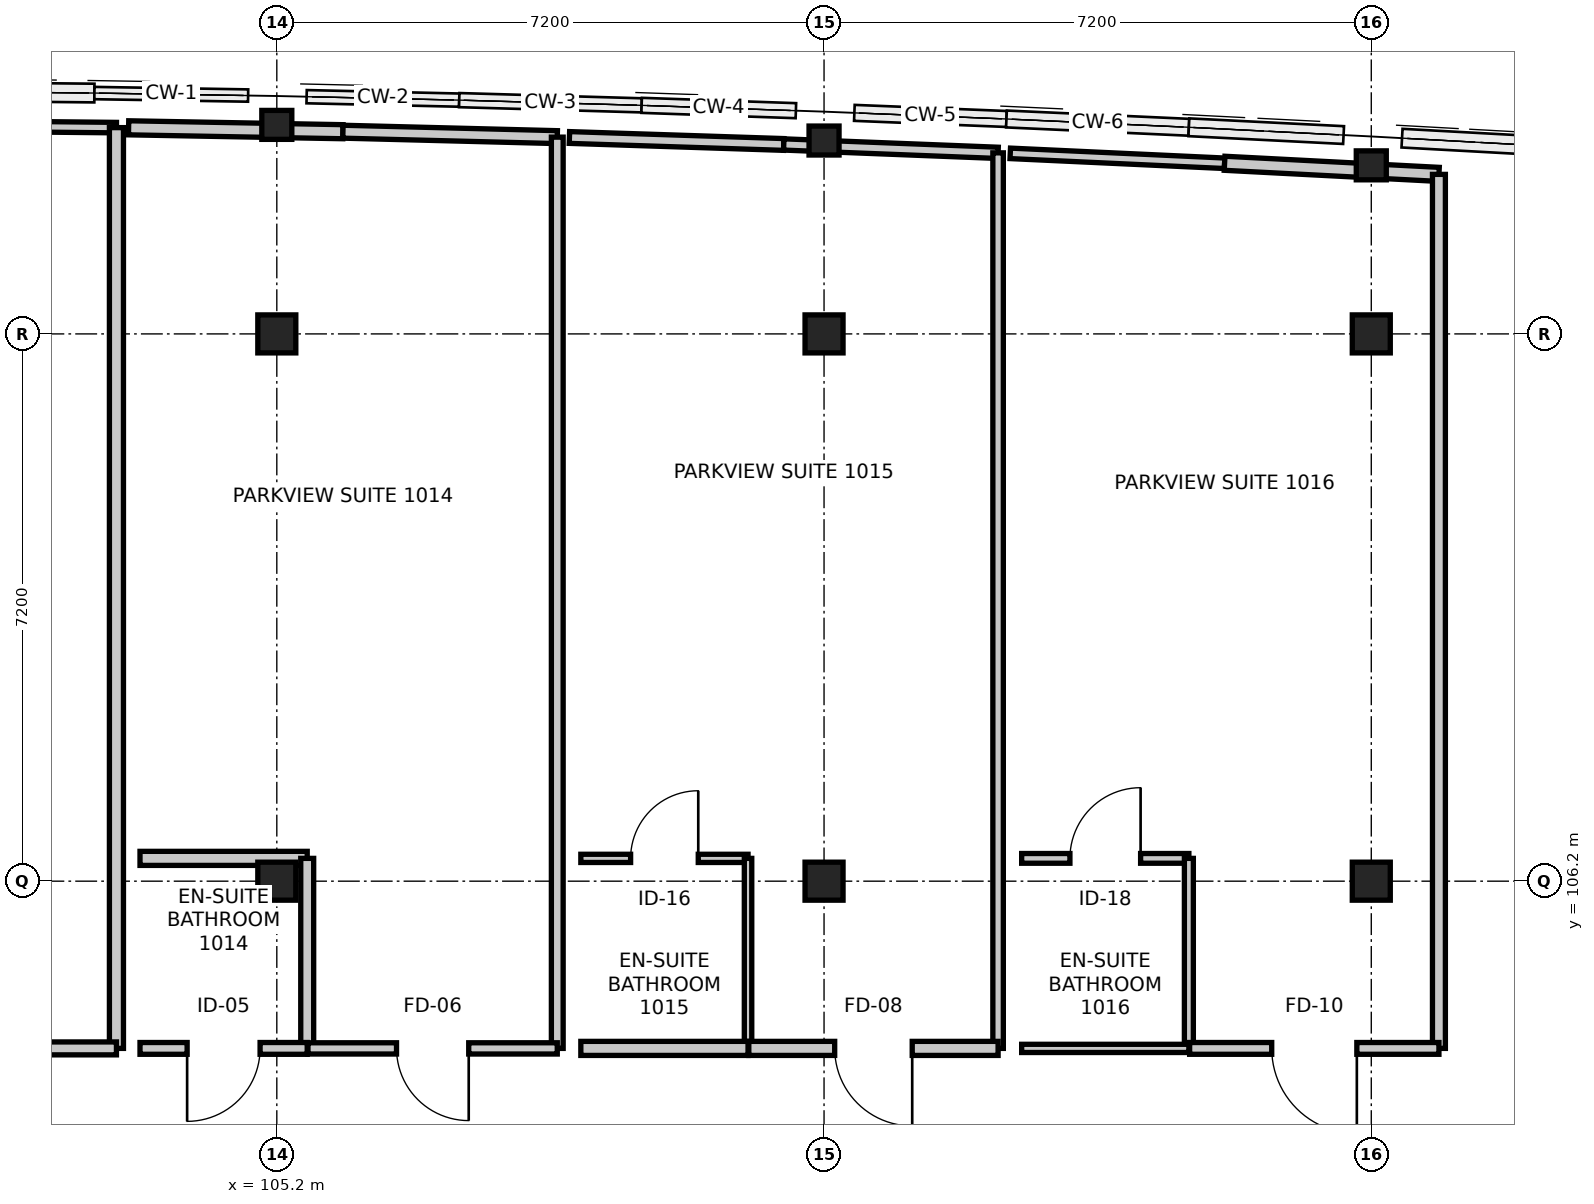
"""IFC4 building model, lengths in metres.
Left out: names, types, materials, properties, quantities, classifications, styles, units other than length and angle.
Written with IfcOpenShell. Run it as: python <this file> out.ifc"""

import sys

from ifc_helpers import new_model, si_unit, direction, frame, frame_2d, origin, origin_2d, place, context, subcontext, project, spatial, rectangle, i_section, extrude, element, fill, save


model = new_model("IFC4")
c1 = context("Model", 3, precision=1e-05, world=origin(), true_north=direction((0.0, 1.0)))
c2 = subcontext(c1, "Body", "Model", "MODEL_VIEW")
j1 = project(units=[si_unit("LENGTHUNIT", "METRE"), si_unit("PLANEANGLEUNIT", "RADIAN")], contexts=[c1])
p1 = place(None, origin())
s1 = spatial("IfcSite", under=j1, at=p1, CompositionType="ELEMENT")
p2 = place(p1, origin())
s2 = spatial("IfcBuilding", under=s1, at=p2, CompositionType="ELEMENT")
p3 = place(p2, frame((0.0, 0.0, 40.8)))
s3 = spatial("IfcBuildingStorey", under=s2, at=p3, CompositionType="ELEMENT", Elevation=40.8)
for number, where, z_axis, x_axis in (
    (1, (105.2, 106.2, 0.0), (0.0, 0.0, 1.0), (1.0, 0.0, 0.0)),
    (2, (105.2, 113.4, 0.0), (0.0, 0.0, 1.0), (1.0, 0.0, 0.0)),
):
    element("IfcColumn", number, at=place(p3, frame(where, z_axis=z_axis, x_axis=x_axis)), inside=s3, PredefinedType="COLUMN", context=c2, shape_type="SweptSolid", body=[
        extrude(rectangle(XDim=0.5, YDim=0.5, at=origin_2d()), origin(), (0.0, 0.0, 1.0), 3.6),
    ])
p4 = place(p3, frame((105.2, 116.15, 0.0), z_axis=(0.0, 0.0, 1.0), x_axis=(1.0, 0.0, 0.0)))
e3 = element("IfcColumn", 3, at=p4, inside=s3, PredefinedType="COLUMN", context=c2, shape_type="SweptSolid", body=[
    extrude(i_section(OverallWidth=0.395, OverallDepth=0.381, WebThickness=0.018, FlangeThickness=0.03, FilletRadius=0.015, at=origin_2d()), origin(), (0.0, 0.0, 1.0), 3.6),
])
for number, where, z_axis, x_axis in (
    (4, (112.4, 106.2, 0.0), (0.0, 0.0, 1.0), (1.0, 0.0, 0.0)),
    (5, (112.4, 113.4, 0.0), (0.0, 0.0, 1.0), (1.0, 0.0, 0.0)),
):
    element("IfcColumn", number, at=place(p3, frame(where, z_axis=z_axis, x_axis=x_axis)), inside=s3, PredefinedType="COLUMN", context=c2, shape_type="SweptSolid", body=[
        extrude(rectangle(XDim=0.5, YDim=0.5, at=origin_2d()), origin(), (0.0, 0.0, 1.0), 3.6),
    ])
p5 = place(p3, frame((112.4, 115.944, 0.0), z_axis=(0.0, 0.0, 1.0), x_axis=(1.0, 0.0, 0.0)))
e6 = element("IfcColumn", 6, at=p5, inside=s3, PredefinedType="COLUMN", context=c2, shape_type="SweptSolid", body=[
    extrude(i_section(OverallWidth=0.395, OverallDepth=0.381, WebThickness=0.018, FlangeThickness=0.03, FilletRadius=0.015, at=origin_2d()), origin(), (0.0, 0.0, 1.0), 3.6),
])
for number, where, z_axis, x_axis in (
    (7, (119.6, 106.2, 0.0), (0.0, 0.0, 1.0), (1.0, 0.0, 0.0)),
    (8, (119.6, 113.4, 0.0), (0.0, 0.0, 1.0), (1.0, 0.0, 0.0)),
):
    element("IfcColumn", number, at=place(p3, frame(where, z_axis=z_axis, x_axis=x_axis)), inside=s3, PredefinedType="COLUMN", context=c2, shape_type="SweptSolid", body=[
        extrude(rectangle(XDim=0.5, YDim=0.5, at=origin_2d()), origin(), (0.0, 0.0, 1.0), 5.5),
    ])
p6 = place(p3, frame((119.6, 115.618, 0.0), z_axis=(0.0, 0.0, 1.0), x_axis=(1.0, 0.0, 0.0)))
e9 = element("IfcColumn", 9, at=p6, inside=s3, PredefinedType="COLUMN", context=c2, shape_type="SweptSolid", body=[
    extrude(i_section(OverallWidth=0.395, OverallDepth=0.381, WebThickness=0.018, FlangeThickness=0.03, FilletRadius=0.015, at=origin_2d()), origin(), (0.0, 0.0, 1.0), 5.5),
])
p7 = place(p3, frame((100.27, 116.143, 0.0), z_axis=(0.0, 0.0, 1.0), x_axis=(0.999948705696, -0.010128473601, 0.0)))
e10 = element("IfcWall", 10, at=p7, inside=s3, PredefinedType="PARTITIONING", context=c2, shape_type="SweptSolid", body=[
    extrude(rectangle(XDim=2.82, YDim=0.138, at=frame_2d((1.41, 0.0))), origin(), (0.0, 0.0, 1.0), 2.956),
])
p8 = place(p3, frame((103.09, 116.114, 0.0), z_axis=(0.0, 0.0, 1.0), x_axis=(0.0, -1.0, 0.0)))
e11 = element("IfcWall", 11, at=p8, inside=s3, PredefinedType="PARTITIONING", context=c2, shape_type="SweptSolid", body=[
    extrude(rectangle(XDim=12.114, YDim=0.185, at=frame_2d((6.057, 0.0))), origin(), (0.0, 0.0, 1.0), 2.765),
])
p9 = place(p3, frame((103.09, 104.0, 0.0), z_axis=(0.0, 0.0, 1.0), x_axis=(-1.0, 0.0, 0.0)))
e12 = element("IfcWall", 12, at=p9, inside=s3, PredefinedType="PARTITIONING", context=c2, shape_type="SweptSolid", body=[
    extrude(rectangle(XDim=3.28, YDim=0.17, at=frame_2d((1.64, 0.0))), origin(), (0.0, 0.0, 1.0), 3.38),
])
p10 = place(p9, frame((1.11, 0.0, 0.0)))
e13 = element("IfcOpeningElement", 13, at=p10, cuts=e12, PredefinedType="OPENING", context=c2, shape_type="SweptSolid", body=[
    extrude(rectangle(XDim=1.06, YDim=2.2, at=frame_2d((0.53, 1.1))), frame((0.0, 0.095, 0.0), z_axis=(0.0, -1.0, 0.0), x_axis=(1.0, 0.0, 0.0)), (0.0, 0.0, 1.0), 0.19),
])
p11 = place(p3, frame((103.4, 106.5, 0.0), z_axis=(0.0, 0.0, 1.0), x_axis=(1.0, 0.0, 0.0)))
e14 = element("IfcWall", 14, at=p11, inside=s3, PredefinedType="PARTITIONING", context=c2, shape_type="SweptSolid", body=[
    extrude(rectangle(XDim=2.2, YDim=0.185, at=frame_2d((1.1, 0.0))), origin(), (0.0, 0.0, 1.0), 2.715),
])
p12 = place(p3, frame((105.6, 106.5, 0.0), z_axis=(0.0, 0.0, 1.0), x_axis=(0.0, -1.0, 0.0)))
e15 = element("IfcWall", 15, at=p12, inside=s3, PredefinedType="PARTITIONING", context=c2, shape_type="SweptSolid", body=[
    extrude(rectangle(XDim=2.5, YDim=0.17, at=frame_2d((1.25, 0.0))), origin(), (0.0, 0.0, 1.0), 2.765),
])
p13 = place(p3, frame((105.6, 104.0, 0.0), z_axis=(0.0, 0.0, 1.0), x_axis=(-1.0, 0.0, 0.0)))
e16 = element("IfcWall", 16, at=p13, inside=s3, PredefinedType="PARTITIONING", context=c2, shape_type="SweptSolid", body=[
    extrude(rectangle(XDim=2.2, YDim=0.155, at=frame_2d((1.1, 0.0))), origin(), (0.0, 0.0, 1.0), 2.715),
])
p14 = place(p13, frame((0.62, 0.0, 0.0)))
e17 = element("IfcOpeningElement", 17, at=p14, cuts=e16, PredefinedType="OPENING", context=c2, shape_type="SweptSolid", body=[
    extrude(rectangle(XDim=0.96, YDim=2.14, at=frame_2d((0.48, 1.07))), frame((0.0, 0.087, 0.0), z_axis=(0.0, -1.0, 0.0), x_axis=(1.0, 0.0, 0.0)), (0.0, 0.0, 1.0), 0.175),
])
p15 = place(p3, frame((103.25, 116.111, 0.0), z_axis=(0.0, 0.0, 1.0), x_axis=(0.999834780317, -0.018177240401, 0.0)))
e18 = element("IfcWall", 18, at=p15, inside=s3, PredefinedType="PARTITIONING", context=c2, shape_type="SweptSolid", body=[
    extrude(rectangle(XDim=2.821, YDim=0.185, at=frame_2d((1.41, 0.0))), origin(), (0.0, 0.0, 1.0), 2.956),
])
p16 = place(p3, frame((106.07, 116.06, 0.0), z_axis=(0.0, 0.0, 1.0), x_axis=(0.999680578889, -0.025273309873, 0.0)))
e19 = element("IfcWall", 19, at=p16, inside=s3, PredefinedType="PARTITIONING", context=c2, shape_type="SweptSolid", body=[
    extrude(rectangle(XDim=2.821, YDim=0.17, at=frame_2d((1.41, 0.0))), origin(), (0.0, 0.0, 1.0), 2.956),
])
p17 = place(p3, frame((108.89, 115.989, 0.0), z_axis=(0.0, 0.0, 1.0), x_axis=(0.0, -1.0, 0.0)))
e20 = element("IfcWall", 20, at=p17, inside=s3, PredefinedType="PARTITIONING", context=c2, shape_type="SweptSolid", body=[
    extrude(rectangle(XDim=11.989, YDim=0.155, at=frame_2d((5.994, 0.0))), origin(), (0.0, 0.0, 1.0), 2.765),
])
p18 = place(p3, frame((108.89, 104.0, 0.0), z_axis=(0.0, 0.0, 1.0), x_axis=(-1.0, 0.0, 0.0)))
e21 = element("IfcWall", 21, at=p18, inside=s3, PredefinedType="PARTITIONING", context=c2, shape_type="SweptSolid", body=[
    extrude(rectangle(XDim=3.28, YDim=0.148, at=frame_2d((1.64, 0.0))), origin(), (0.0, 0.0, 1.0), 3.38),
])
p19 = place(p18, frame((1.165, 0.0, 0.0)))
e22 = element("IfcOpeningElement", 22, at=p19, cuts=e21, PredefinedType="OPENING", context=c2, shape_type="SweptSolid", body=[
    extrude(rectangle(XDim=0.95, YDim=2.1, at=frame_2d((0.475, 1.05))), frame((0.0, 0.084, 0.0), z_axis=(0.0, -1.0, 0.0), x_axis=(1.0, 0.0, 0.0)), (0.0, 0.0, 1.0), 0.168),
])
p20 = place(p3, frame((109.2, 106.5, 0.0), z_axis=(0.0, 0.0, 1.0), x_axis=(1.0, 0.0, 0.0)))
e23 = element("IfcWall", 23, at=p20, inside=s3, PredefinedType="PARTITIONING", context=c2, shape_type="SweptSolid", body=[
    extrude(rectangle(XDim=2.2, YDim=0.108, at=frame_2d((1.1, 0.0))), origin(), (0.0, 0.0, 1.0), 3.38),
])
p21 = place(p20, frame((0.655, 0.0, 0.0)))
e24 = element("IfcOpeningElement", 24, at=p21, cuts=e23, PredefinedType="OPENING", context=c2, shape_type="SweptSolid", body=[
    extrude(rectangle(XDim=0.89, YDim=2.09, at=frame_2d((0.445, 1.045))), frame((0.0, 0.064, 0.0), z_axis=(0.0, -1.0, 0.0), x_axis=(1.0, 0.0, 0.0)), (0.0, 0.0, 1.0), 0.128),
])
p22 = place(p3, frame((111.4, 106.5, 0.0), z_axis=(0.0, 0.0, 1.0), x_axis=(0.0, -1.0, 0.0)))
e25 = element("IfcWall", 25, at=p22, inside=s3, PredefinedType="PARTITIONING", context=c2, shape_type="SweptSolid", body=[
    extrude(rectangle(XDim=2.5, YDim=0.098, at=frame_2d((1.25, 0.0))), origin(), (0.0, 0.0, 1.0), 2.765),
])
p23 = place(p3, frame((111.4, 104.0, 0.0), z_axis=(0.0, 0.0, 1.0), x_axis=(-1.0, 0.0, 0.0)))
e26 = element("IfcWall", 26, at=p23, inside=s3, PredefinedType="PARTITIONING", context=c2, shape_type="SweptSolid", body=[
    extrude(rectangle(XDim=2.2, YDim=0.185, at=frame_2d((1.1, 0.0))), origin(), (0.0, 0.0, 1.0), 3.38),
])
p24 = place(p3, frame((109.05, 115.984, 0.0), z_axis=(0.0, 0.0, 1.0), x_axis=(0.999470627271, -0.032534062493, 0.0)))
e27 = element("IfcWall", 27, at=p24, inside=s3, PredefinedType="PARTITIONING", context=c2, shape_type="SweptSolid", body=[
    extrude(rectangle(XDim=2.822, YDim=0.155, at=frame_2d((1.411, 0.0))), origin(), (0.0, 0.0, 1.0), 2.956),
])
p25 = place(p3, frame((111.87, 115.892, 0.0), z_axis=(0.0, 0.0, 1.0), x_axis=(0.999235135651, -0.03910426678, 0.0)))
e28 = element("IfcWall", 28, at=p25, inside=s3, PredefinedType="PARTITIONING", context=c2, shape_type="SweptSolid", body=[
    extrude(rectangle(XDim=2.822, YDim=0.148, at=frame_2d((1.411, 0.0))), origin(), (0.0, 0.0, 1.0), 2.956),
])
p26 = place(p3, frame((114.69, 115.782, 0.0), z_axis=(0.0, 0.0, 1.0), x_axis=(0.0, -1.0, 0.0)))
e29 = element("IfcWall", 29, at=p26, inside=s3, PredefinedType="PARTITIONING", context=c2, shape_type="SweptSolid", body=[
    extrude(rectangle(XDim=11.782, YDim=0.138, at=frame_2d((5.891, 0.0))), origin(), (0.0, 0.0, 1.0), 2.765),
])
p27 = place(p3, frame((114.69, 104.0, 0.0), z_axis=(0.0, 0.0, 1.0), x_axis=(-1.0, 0.0, 0.0)))
e30 = element("IfcWall", 30, at=p27, inside=s3, PredefinedType="PARTITIONING", context=c2, shape_type="SweptSolid", body=[
    extrude(rectangle(XDim=3.28, YDim=0.185, at=frame_2d((1.64, 0.0))), origin(), (0.0, 0.0, 1.0), 2.715),
])
p28 = place(p27, frame((1.13, 0.0, 0.0)))
e31 = element("IfcOpeningElement", 31, at=p28, cuts=e30, PredefinedType="OPENING", context=c2, shape_type="SweptSolid", body=[
    extrude(rectangle(XDim=1.02, YDim=2.15, at=frame_2d((0.51, 1.075))), frame((0.0, 0.103, 0.0), z_axis=(0.0, -1.0, 0.0), x_axis=(1.0, 0.0, 0.0)), (0.0, 0.0, 1.0), 0.205),
])
p29 = place(p3, frame((115.0, 106.5, 0.0), z_axis=(0.0, 0.0, 1.0), x_axis=(1.0, 0.0, 0.0)))
e32 = element("IfcWall", 32, at=p29, inside=s3, PredefinedType="PARTITIONING", context=c2, shape_type="SweptSolid", body=[
    extrude(rectangle(XDim=2.2, YDim=0.128, at=frame_2d((1.1, 0.0))), origin(), (0.0, 0.0, 1.0), 3.38),
])
p30 = place(p29, frame((0.635, 0.0, 0.0)))
e33 = element("IfcOpeningElement", 33, at=p30, cuts=e32, PredefinedType="OPENING", context=c2, shape_type="SweptSolid", body=[
    extrude(rectangle(XDim=0.93, YDim=2.13, at=frame_2d((0.465, 1.065))), frame((0.0, 0.074, 0.0), z_axis=(0.0, -1.0, 0.0), x_axis=(1.0, 0.0, 0.0)), (0.0, 0.0, 1.0), 0.148),
])
p31 = place(p3, frame((117.2, 106.5, 0.0), z_axis=(0.0, 0.0, 1.0), x_axis=(0.0, -1.0, 0.0)))
e34 = element("IfcWall", 34, at=p31, inside=s3, PredefinedType="PARTITIONING", context=c2, shape_type="SweptSolid", body=[
    extrude(rectangle(XDim=2.5, YDim=0.118, at=frame_2d((1.25, 0.0))), origin(), (0.0, 0.0, 1.0), 2.765),
])
p32 = place(p3, frame((117.2, 104.0, 0.0), z_axis=(0.0, 0.0, 1.0), x_axis=(-1.0, 0.0, 0.0)))
e35 = element("IfcWall", 35, at=p32, inside=s3, PredefinedType="PARTITIONING", context=c2, shape_type="SweptSolid", body=[
    extrude(rectangle(XDim=2.2, YDim=0.108, at=frame_2d((1.1, 0.0))), origin(), (0.0, 0.0, 1.0), 3.38),
])
p33 = place(p3, frame((114.85, 115.775, 0.0), z_axis=(0.0, 0.0, 1.0), x_axis=(0.998928935986, -0.046270734264, 0.0)))
e36 = element("IfcWall", 36, at=p33, inside=s3, PredefinedType="PARTITIONING", context=c2, shape_type="SweptSolid", body=[
    extrude(rectangle(XDim=2.823, YDim=0.138, at=frame_2d((1.411, 0.0))), origin(), (0.0, 0.0, 1.0), 3.38),
])
p34 = place(p3, frame((117.67, 115.645, 0.0), z_axis=(0.0, 0.0, 1.0), x_axis=(0.998662600101, -0.051701171748, 0.0)))
e37 = element("IfcWall", 37, at=p34, inside=s3, PredefinedType="PARTITIONING", context=c2, shape_type="SweptSolid", body=[
    extrude(rectangle(XDim=2.824, YDim=0.185, at=frame_2d((1.412, 0.0))), origin(), (0.0, 0.0, 1.0), 3.38),
])
p35 = place(p3, frame((120.49, 115.499, 0.0), z_axis=(0.0, 0.0, 1.0), x_axis=(0.0, -1.0, 0.0)))
e38 = element("IfcWall", 38, at=p35, inside=s3, PredefinedType="PARTITIONING", context=c2, shape_type="SweptSolid", body=[
    extrude(rectangle(XDim=11.499, YDim=0.17, at=frame_2d((5.75, 0.0))), origin(), (0.0, 0.0, 1.0), 2.86),
])
p36 = place(p3, frame((120.49, 104.0, 0.0), z_axis=(0.0, 0.0, 1.0), x_axis=(-1.0, 0.0, 0.0)))
e39 = element("IfcWall", 39, at=p36, inside=s3, PredefinedType="PARTITIONING", context=c2, shape_type="SweptSolid", body=[
    extrude(rectangle(XDim=3.28, YDim=0.155, at=frame_2d((1.64, 0.0))), origin(), (0.0, 0.0, 1.0), 2.715),
])
p37 = place(p36, frame((1.08, 0.0, 0.0)))
e40 = element("IfcOpeningElement", 40, at=p37, cuts=e39, PredefinedType="OPENING", context=c2, shape_type="SweptSolid", body=[
    extrude(rectangle(XDim=1.12, YDim=2.2, at=frame_2d((0.56, 1.1))), frame((0.0, 0.087, 0.0), z_axis=(0.0, -1.0, 0.0), x_axis=(1.0, 0.0, 0.0)), (0.0, 0.0, 1.0), 0.175),
])
p38 = place(p14, origin())
e41 = element("IfcDoor", 41, at=p38, inside=s3, OperationType="SINGLE_SWING_RIGHT", PredefinedType="DOOR", context=c2, shape_type="SweptSolid", body=[
    extrude(rectangle(XDim=0.96, YDim=2.14, at=frame_2d((0.48, 1.07))), frame((0.0, 0.025, 0.0), z_axis=(0.0, -1.0, 0.0), x_axis=(1.0, 0.0, 0.0)), (0.0, 0.0, 1.0), 0.05),
])
fill(e17, e41)
p39 = place(p19, origin())
e42 = element("IfcDoor", 42, at=p39, inside=s3, OperationType="SINGLE_SWING_LEFT", PredefinedType="DOOR", context=c2, shape_type="SweptSolid", body=[
    extrude(rectangle(XDim=0.95, YDim=2.1, at=frame_2d((0.475, 1.05))), frame((0.0, 0.025, 0.0), z_axis=(0.0, -1.0, 0.0), x_axis=(1.0, 0.0, 0.0)), (0.0, 0.0, 1.0), 0.05),
])
fill(e22, e42)
p40 = place(p21, origin())
e43 = element("IfcDoor", 43, at=p40, inside=s3, OperationType="SINGLE_SWING_RIGHT", PredefinedType="DOOR", context=c2, shape_type="SweptSolid", body=[
    extrude(rectangle(XDim=0.89, YDim=2.09, at=frame_2d((0.445, 1.045))), frame((0.0, 0.025, 0.0), z_axis=(0.0, -1.0, 0.0), x_axis=(1.0, 0.0, 0.0)), (0.0, 0.0, 1.0), 0.05),
])
fill(e24, e43)
p41 = place(p28, origin())
e44 = element("IfcDoor", 44, at=p41, inside=s3, OperationType="SINGLE_SWING_LEFT", PredefinedType="DOOR", context=c2, shape_type="SweptSolid", body=[
    extrude(rectangle(XDim=1.02, YDim=2.15, at=frame_2d((0.51, 1.075))), frame((0.0, 0.025, 0.0), z_axis=(0.0, -1.0, 0.0), x_axis=(1.0, 0.0, 0.0)), (0.0, 0.0, 1.0), 0.05),
])
fill(e31, e44)
p42 = place(p30, origin())
e45 = element("IfcDoor", 45, at=p42, inside=s3, OperationType="SINGLE_SWING_RIGHT", PredefinedType="DOOR", context=c2, shape_type="SweptSolid", body=[
    extrude(rectangle(XDim=0.93, YDim=2.13, at=frame_2d((0.465, 1.065))), frame((0.0, 0.025, 0.0), z_axis=(0.0, -1.0, 0.0), x_axis=(1.0, 0.0, 0.0)), (0.0, 0.0, 1.0), 0.05),
])
fill(e33, e45)
p43 = place(p37, origin())
e46 = element("IfcDoor", 46, at=p43, inside=s3, OperationType="SINGLE_SWING_LEFT", PredefinedType="DOOR", context=c2, shape_type="SweptSolid", body=[
    extrude(rectangle(XDim=1.12, YDim=2.2, at=frame_2d((0.56, 1.1))), frame((0.0, 0.025, 0.0), z_axis=(0.0, -1.0, 0.0), x_axis=(1.0, 0.0, 0.0)), (0.0, 0.0, 1.0), 0.05),
])
fill(e40, e46)
save(model, sys.argv[1])
